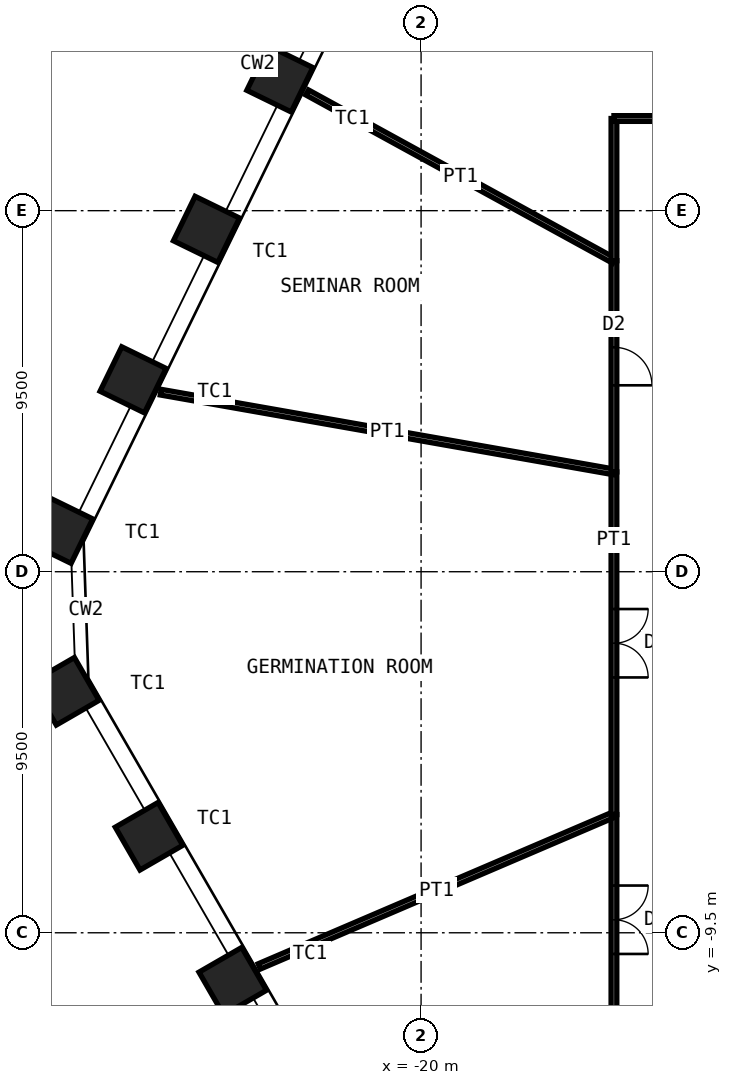
"""IFC4 building model, lengths in metres.
Left out: names, types, materials, properties, quantities, classifications, styles, units other than length and angle.
Written with IfcOpenShell. Run it as: python <this file> out.ifc"""

import sys

from ifc_helpers import new_model, si_unit, direction, frame, frame_2d, origin, origin_2d, place, context, subcontext, project, spatial, rectangle, hollow_rectangle, extrude, element, fill, save


model = new_model("IFC4")
c1 = context("Model", 3, precision=1e-05, world=origin(), true_north=direction((0.0, 1.0)))
c2 = subcontext(c1, "Body", "Model", "MODEL_VIEW")
j1 = project(units=[si_unit("LENGTHUNIT", "METRE"), si_unit("PLANEANGLEUNIT", "RADIAN")], contexts=[c1])
p1 = place(None, origin())
s1 = spatial("IfcSite", under=j1, at=p1, CompositionType="ELEMENT")
p2 = place(p1, origin())
s2 = spatial("IfcBuilding", under=s1, at=p2, CompositionType="ELEMENT")
p3 = place(p2, frame((0.0, 0.0, 22.0)))
s3 = spatial("IfcBuildingStorey", under=s2, at=p3, CompositionType="ELEMENT", Elevation=22.0)
for number, where, z_axis, x_axis in (
    (1, (-24.956, -10.775, 0.0), (0.0, 0.0, 1.0), (0.5, -0.866, 0.0)),
    (2, (-27.158, -6.96, 0.0), (0.0, 0.0, 1.0), (0.5, -0.866, 0.0)),
    (3, (-29.361, -3.146, 0.0), (0.0, 0.0, 1.0), (0.5, -0.866, 0.0)),
    (4, (-29.509, 1.09, 0.0), (0.0, 0.0, 1.0), (-0.438, -0.899, 0.0)),
    (5, (-27.578, 5.049, 0.0), (0.0, 0.0, 1.0), (-0.438, -0.899, 0.0)),
    (6, (-25.647, 9.008, 0.0), (0.0, 0.0, 1.0), (-0.438, -0.899, 0.0)),
    (7, (-23.716, 12.966, 0.0), (0.0, 0.0, 1.0), (-0.438, -0.899, 0.0)),
):
    element("IfcColumn", number, at=place(p3, frame(where, z_axis=z_axis, x_axis=x_axis)), inside=s3, PredefinedType="COLUMN", context=c2, shape_type="SweptSolid", body=[
        extrude(hollow_rectangle(XDim=1.3, YDim=1.3, WallThickness=0.1, at=origin_2d()), origin(), (0.0, 0.0, 1.0), 5.0),
    ])
p4 = place(p3, frame((-14.925, -11.925, 0.0), z_axis=(0.0, 0.0, 1.0), x_axis=(0.0, 1.0, 0.0)))
e8 = element("IfcWall", 8, at=p4, inside=s3, PredefinedType="PARTITIONING", context=c2, shape_type="SweptSolid", body=[
    extrude(rectangle(XDim=5.535, YDim=0.15, at=frame_2d((2.768, 0.0))), origin(), (0.0, 0.0, 1.0), 4.8),
])
p5 = place(p4, frame((1.868, 0.0, 0.0)))
e9 = element("IfcOpeningElement", 9, at=p5, cuts=e8, PredefinedType="OPENING", context=c2, shape_type="SweptSolid", body=[
    extrude(rectangle(XDim=1.8, YDim=2.4, at=frame_2d((0.9, 1.2))), frame((0.0, 0.085, 0.0), z_axis=(0.0, -1.0, 0.0), x_axis=(1.0, 0.0, 0.0)), (0.0, 0.0, 1.0), 0.17),
])
p6 = place(p3, frame((-24.258, -10.385, 0.0), z_axis=(0.0, 0.0, 1.0), x_axis=(0.9192967113, 0.393565187222, 0.0)))
e10 = element("IfcWall", 10, at=p6, inside=s3, PredefinedType="PARTITIONING", context=c2, shape_type="SweptSolid", body=[
    extrude(rectangle(XDim=10.152, YDim=0.15, at=frame_2d((5.076, 0.0))), origin(), (0.0, 0.0, 1.0), 3.7),
])
p7 = place(p3, frame((-14.925, -6.39, 0.0), z_axis=(0.0, 0.0, 1.0), x_axis=(0.0, 1.0, 0.0)))
e11 = element("IfcWall", 11, at=p7, inside=s3, PredefinedType="PARTITIONING", context=c2, shape_type="SweptSolid", body=[
    extrude(rectangle(XDim=9.016, YDim=0.15, at=frame_2d((4.508, 0.0))), origin(), (0.0, 0.0, 1.0), 4.8),
])
p8 = place(p7, frame((3.608, 0.0, 0.0)))
e12 = element("IfcOpeningElement", 12, at=p8, cuts=e11, PredefinedType="OPENING", context=c2, shape_type="SweptSolid", body=[
    extrude(rectangle(XDim=1.8, YDim=2.4, at=frame_2d((0.9, 1.2))), frame((0.0, 0.085, 0.0), z_axis=(0.0, -1.0, 0.0), x_axis=(1.0, 0.0, 0.0)), (0.0, 0.0, 1.0), 0.17),
])
p9 = place(p3, frame((-26.85, 4.725, 0.0), z_axis=(0.0, 0.0, 1.0), x_axis=(0.984868693876, -0.173302209517, 0.0)))
e13 = element("IfcWall", 13, at=p9, inside=s3, PredefinedType="PARTITIONING", context=c2, shape_type="SweptSolid", body=[
    extrude(rectangle(XDim=12.108, YDim=0.15, at=frame_2d((6.054, 0.0))), origin(), (0.0, 0.0, 1.0), 3.7),
])
p10 = place(p3, frame((-14.925, 2.626, 0.0), z_axis=(0.0, 0.0, 1.0), x_axis=(0.0, 1.0, 0.0)))
e14 = element("IfcWall", 14, at=p10, inside=s3, PredefinedType="PARTITIONING", context=c2, shape_type="SweptSolid", body=[
    extrude(rectangle(XDim=5.558, YDim=0.15, at=frame_2d((2.779, 0.0))), origin(), (0.0, 0.0, 1.0), 4.8),
])
p11 = place(p10, frame((2.279, 0.0, 0.0)))
e15 = element("IfcOpeningElement", 15, at=p11, cuts=e14, PredefinedType="OPENING", context=c2, shape_type="SweptSolid", body=[
    extrude(rectangle(XDim=1.0, YDim=2.4, at=frame_2d((0.5, 1.2))), frame((0.0, 0.085, 0.0), z_axis=(0.0, -1.0, 0.0), x_axis=(1.0, 0.0, 0.0)), (0.0, 0.0, 1.0), 0.17),
])
p12 = place(p3, frame((-22.999, 12.612, 0.0), z_axis=(0.0, 0.0, 1.0), x_axis=(0.876826470608, -0.480806967963, 0.0)))
e16 = element("IfcWall", 16, at=p12, inside=s3, PredefinedType="PARTITIONING", context=c2, shape_type="SweptSolid", body=[
    extrude(rectangle(XDim=9.208, YDim=0.15, at=frame_2d((4.604, 0.0))), origin(), (0.0, 0.0, 1.0), 3.7),
])
p13 = place(p3, frame((-14.925, 8.184, 0.0), z_axis=(0.0, 0.0, 1.0), x_axis=(0.0, 1.0, 0.0)))
e17 = element("IfcWall", 17, at=p13, inside=s3, PredefinedType="PARTITIONING", context=c2, shape_type="SweptSolid", body=[
    extrude(rectangle(XDim=3.741, YDim=0.15, at=frame_2d((1.871, 0.0))), origin(), (0.0, 0.0, 1.0), 4.8),
])
p14 = place(p3, frame((-14.925, 11.925, 0.0), z_axis=(0.0, 0.0, 1.0), x_axis=(1.0, 0.0, 0.0)))
e18 = element("IfcWall", 18, at=p14, inside=s3, PredefinedType="PARTITIONING", context=c2, shape_type="SweptSolid", body=[
    extrude(rectangle(XDim=10.361, YDim=0.15, at=frame_2d((5.18, 0.0))), origin(), (0.0, 0.0, 1.0), 4.8),
])
p15 = place(p14, frame((4.28, 0.0, 0.0)))
e19 = element("IfcOpeningElement", 19, at=p15, cuts=e18, PredefinedType="OPENING", context=c2, shape_type="SweptSolid", body=[
    extrude(rectangle(XDim=1.8, YDim=2.4, at=frame_2d((0.9, 1.2))), frame((0.0, 0.085, 0.0), z_axis=(0.0, -1.0, 0.0), x_axis=(1.0, 0.0, 0.0)), (0.0, 0.0, 1.0), 0.17),
])
p16 = place(p5, origin())
e20 = element("IfcDoor", 20, at=p16, inside=s3, OperationType="DOUBLE_DOOR_DOUBLE_SWING", PredefinedType="DOOR", context=c2, shape_type="SweptSolid", body=[
    extrude(rectangle(XDim=1.8, YDim=2.4, at=frame_2d((0.9, 1.2))), frame((0.0, 0.025, 0.0), z_axis=(0.0, -1.0, 0.0), x_axis=(1.0, 0.0, 0.0)), (0.0, 0.0, 1.0), 0.05),
])
fill(e9, e20)
p17 = place(p8, origin())
e21 = element("IfcDoor", 21, at=p17, inside=s3, OperationType="DOUBLE_DOOR_DOUBLE_SWING", PredefinedType="DOOR", context=c2, shape_type="SweptSolid", body=[
    extrude(rectangle(XDim=1.8, YDim=2.4, at=frame_2d((0.9, 1.2))), frame((0.0, 0.025, 0.0), z_axis=(0.0, -1.0, 0.0), x_axis=(1.0, 0.0, 0.0)), (0.0, 0.0, 1.0), 0.05),
])
fill(e12, e21)
p18 = place(p11, origin())
e22 = element("IfcDoor", 22, at=p18, inside=s3, OperationType="SINGLE_SWING_LEFT", PredefinedType="DOOR", context=c2, shape_type="SweptSolid", body=[
    extrude(rectangle(XDim=1.0, YDim=2.4, at=frame_2d((0.5, 1.2))), frame((0.0, 0.025, 0.0), z_axis=(0.0, -1.0, 0.0), x_axis=(1.0, 0.0, 0.0)), (0.0, 0.0, 1.0), 0.05),
])
fill(e15, e22)
save(model, sys.argv[1])
